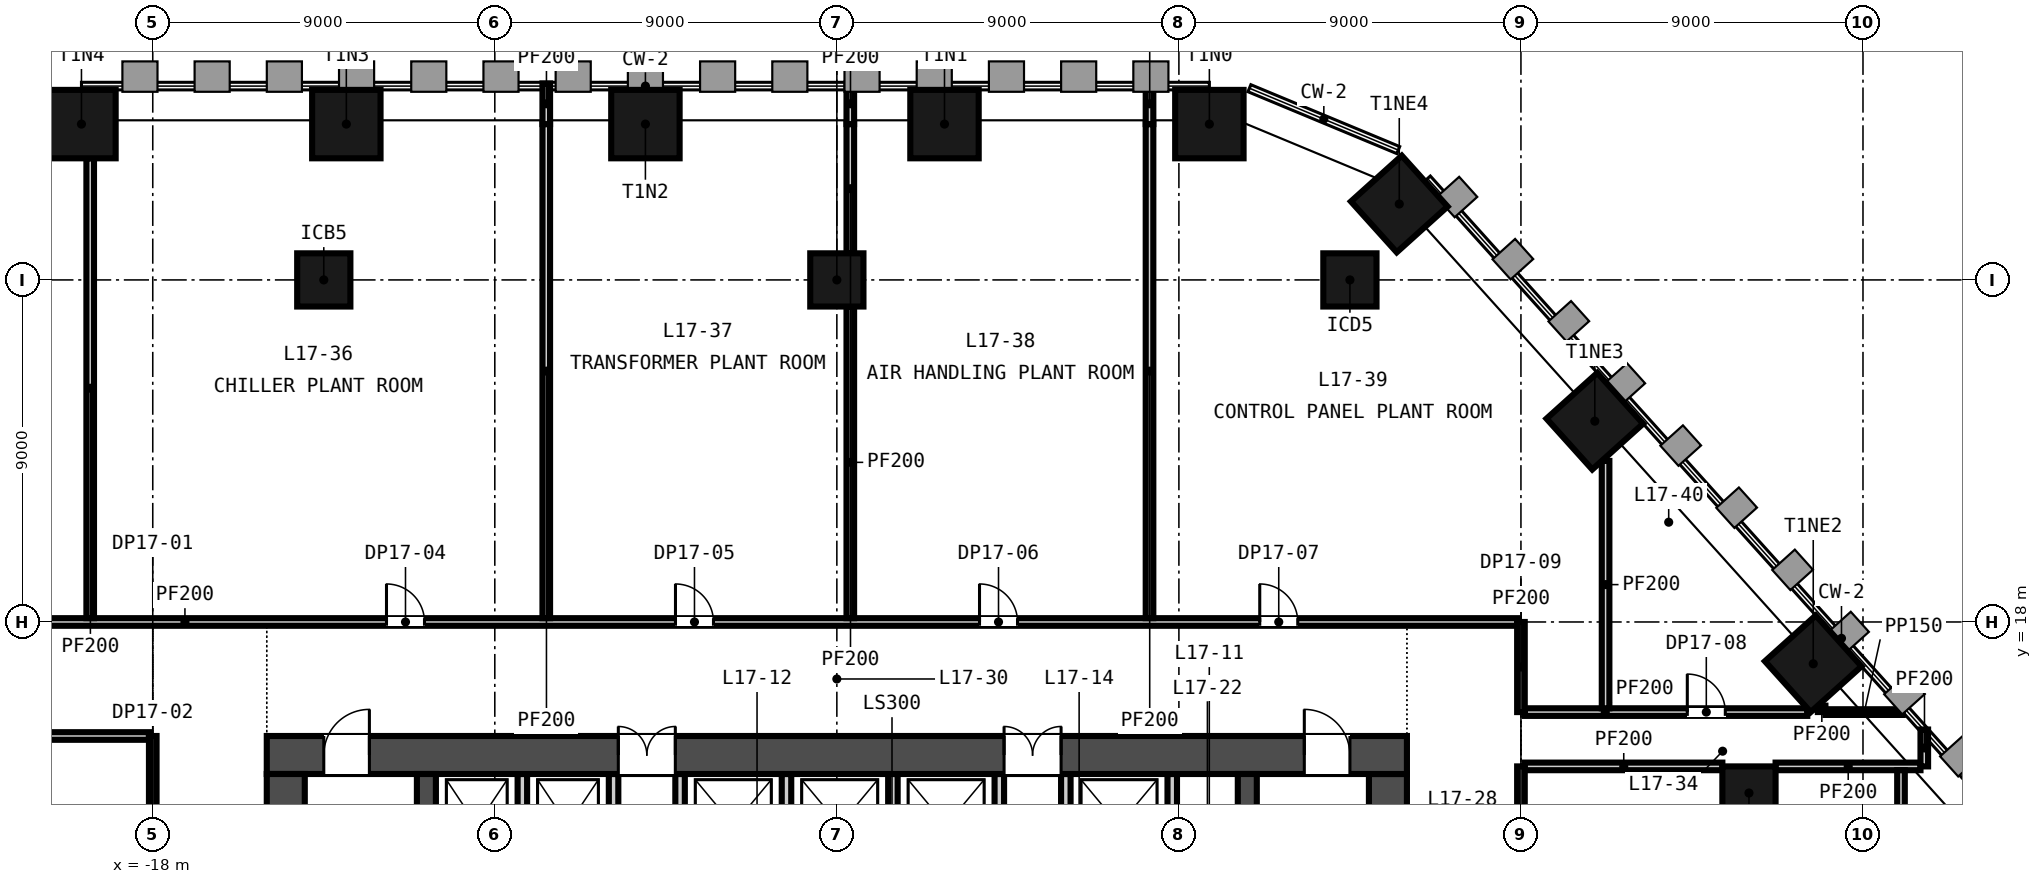
"""IFC4 building model, lengths in metres.
Left out: names, types, materials, properties, quantities, classifications, styles, units other than length and angle.
Written with IfcOpenShell. Run it as: python <this file> out.ifc"""

import sys

from ifc_helpers import new_model, si_unit, direction, frame, frame_2d, origin, origin_2d, place, context, subcontext, project, spatial, rectangle, extrude, element, fill, save


model = new_model("IFC4")
c1 = context("Model", 3, precision=1e-05, world=origin(), true_north=direction((0.0, 1.0)))
c2 = subcontext(c1, "Body", "Model", "MODEL_VIEW")
j1 = project(units=[si_unit("LENGTHUNIT", "METRE"), si_unit("PLANEANGLEUNIT", "RADIAN")], contexts=[c1])
p1 = place(None, origin())
s1 = spatial("IfcSite", under=j1, at=p1, CompositionType="ELEMENT")
p2 = place(p1, origin())
s2 = spatial("IfcBuilding", under=s1, at=p2, CompositionType="ELEMENT")
p3 = place(p2, frame((0.0, 0.0, 76.15)))
s3 = spatial("IfcBuildingStorey", under=s2, at=p3, CompositionType="ELEMENT", Elevation=76.15)
p4 = place(p3, frame((-15.0, 14.5, -0.3), z_axis=(0.0, 0.0, 1.0), x_axis=(1.0, 0.0, 0.0)))
e1 = element("IfcWall", 1, at=p4, inside=s3, PredefinedType="SOLIDWALL", context=c2, shape_type="SweptSolid", body=[
    extrude(rectangle(XDim=30.0, YDim=1.0, at=frame_2d((15.0, 0.0))), origin(), (0.0, 0.0, 1.0), 4.65),
])
p5 = place(p4, frame((9.25, 0.0, 0.3)))
e2 = element("IfcOpeningElement", 2, at=p5, cuts=e1, PredefinedType="OPENING", context=c2, shape_type="SweptSolid", body=[
    extrude(rectangle(XDim=1.5, YDim=2.1, at=frame_2d((0.75, 1.05))), frame((0.0, 0.51, 0.0), z_axis=(0.0, -1.0, 0.0), x_axis=(1.0, 0.0, 0.0)), (0.0, 0.0, 1.0), 1.02),
])
p6 = place(p4, frame((19.4, 0.0, 0.3)))
e3 = element("IfcOpeningElement", 3, at=p6, cuts=e1, PredefinedType="OPENING", context=c2, shape_type="SweptSolid", body=[
    extrude(rectangle(XDim=1.5, YDim=2.1, at=frame_2d((0.75, 1.05))), frame((0.0, 0.51, 0.0), z_axis=(0.0, -1.0, 0.0), x_axis=(1.0, 0.0, 0.0)), (0.0, 0.0, 1.0), 1.02),
])
p7 = place(p4, frame((1.5, 0.0, 0.3)))
e4 = element("IfcOpeningElement", 4, at=p7, cuts=e1, PredefinedType="OPENING", context=c2, shape_type="SweptSolid", body=[
    extrude(rectangle(XDim=1.2, YDim=2.1, at=frame_2d((0.6, 1.05))), frame((0.0, 0.51, 0.0), z_axis=(0.0, -1.0, 0.0), x_axis=(1.0, 0.0, 0.0)), (0.0, 0.0, 1.0), 1.02),
])
p8 = place(p4, frame((27.3, 0.0, 0.3)))
e5 = element("IfcOpeningElement", 5, at=p8, cuts=e1, PredefinedType="OPENING", context=c2, shape_type="SweptSolid", body=[
    extrude(rectangle(XDim=1.2, YDim=2.1, at=frame_2d((0.6, 1.05))), frame((0.0, 0.51, 0.0), z_axis=(0.0, -1.0, 0.0), x_axis=(1.0, 0.0, 0.0)), (0.0, 0.0, 1.0), 1.02),
])
for number, where, z_axis, x_axis in (
    (6, (-14.5, 1.0, -0.3), (0.0, 0.0, 1.0), (0.0, 1.0, 0.0)),
    (7, (14.5, 1.0, -0.3), (0.0, 0.0, 1.0), (0.0, 1.0, 0.0)),
):
    element("IfcWall", number, at=place(p3, frame(where, z_axis=z_axis, x_axis=x_axis)), inside=s3, PredefinedType="SOLIDWALL", context=c2, shape_type="SweptSolid", body=[
        extrude(rectangle(XDim=13.0, YDim=1.0, at=frame_2d((6.5, 0.0))), origin(), (0.0, 0.0, 1.0), 4.65),
    ])
for number, where, z_axis, x_axis in (
    (8, (-10.8, 1.0, -0.3), (0.0, 0.0, 1.0), (0.0, 1.0, 0.0)),
    (9, (10.8, 1.0, -0.3), (0.0, 0.0, 1.0), (0.0, 1.0, 0.0)),
):
    element("IfcWall", number, at=place(p3, frame(where, z_axis=z_axis, x_axis=x_axis)), inside=s3, PredefinedType="SOLIDWALL", context=c2, shape_type="SweptSolid", body=[
        extrude(rectangle(XDim=13.0, YDim=0.5, at=frame_2d((6.5, 0.0))), origin(), (0.0, 0.0, 1.0), 4.65),
    ])
for number, where, z_axis, x_axis in (
    (10, (9.802, 31.1, -0.3), (0.0, 0.0, 1.0), (-1.0, 0.0, 0.0)),
    (11, (2.832, 31.1, -0.3), (0.0, 0.0, 1.0), (-1.0, 0.0, 0.0)),
    (12, (-5.037, 31.1, -0.3), (0.0, 0.0, 1.0), (-1.0, 0.0, 0.0)),
    (13, (-12.907, 31.1, -0.3), (0.0, 0.0, 1.0), (-1.0, 0.0, 0.0)),
    (14, (-19.876, 31.1, -0.3), (0.0, 0.0, 1.0), (-1.0, 0.0, 0.0)),
    (15, (25.691, 16.9, -0.3), (0.0, 0.0, 1.0), (-0.669, 0.743, 0.0)),
    (16, (19.944, 23.283, -0.3), (0.0, 0.0, 1.0), (-0.669, 0.743, 0.0)),
    (17, (14.799, 28.998, -0.3), (0.0, 0.0, 1.0), (-0.669, 0.743, 0.0)),
):
    element("IfcColumn", number, at=place(p3, frame(where, z_axis=z_axis, x_axis=x_axis)), inside=s3, PredefinedType="COLUMN", context=c2, shape_type="SweptSolid", body=[
        extrude(rectangle(XDim=1.8, YDim=1.8, at=origin_2d()), origin(), (0.0, 0.0, 1.0), 4.65),
    ])
for number, where, z_axis, x_axis in (
    (18, (-13.5, 27.0, -0.3), (0.0, 0.0, 1.0), (1.0, 0.0, 0.0)),
    (19, (0.0, 27.0, -0.3), (0.0, 0.0, 1.0), (1.0, 0.0, 0.0)),
    (20, (13.5, 27.0, -0.3), (0.0, 0.0, 1.0), (1.0, 0.0, 0.0)),
    (21, (24.0, 13.5, -0.3), (0.0, 0.0, 1.0), (1.0, 0.0, 0.0)),
):
    element("IfcColumn", number, at=place(p3, frame(where, z_axis=z_axis, x_axis=x_axis)), inside=s3, PredefinedType="COLUMN", context=c2, shape_type="SweptSolid", body=[
        extrude(rectangle(XDim=1.4, YDim=1.4, at=origin_2d()), origin(), (0.0, 0.0, 1.0), 4.65),
    ])
for number, where, z_axis, x_axis in (
    (22, (-8.275, 11.3, 0.0), (0.0, 0.0, 1.0), (0.0, 1.0, 0.0)),
    (23, (-5.875, 11.3, 0.0), (0.0, 0.0, 1.0), (0.0, 1.0, 0.0)),
    (24, (-4.125, 11.3, 0.0), (0.0, 0.0, 1.0), (0.0, 1.0, 0.0)),
    (25, (-1.325, 11.3, 0.0), (0.0, 0.0, 1.0), (0.0, 1.0, 0.0)),
    (26, (1.475, 11.3, 0.0), (0.0, 0.0, 1.0), (0.0, 1.0, 0.0)),
    (27, (4.275, 11.3, 0.0), (0.0, 0.0, 1.0), (0.0, 1.0, 0.0)),
    (28, (6.025, 11.3, 0.0), (0.0, 0.0, 1.0), (0.0, 1.0, 0.0)),
    (29, (8.825, 11.3, 0.0), (0.0, 0.0, 1.0), (0.0, 1.0, 0.0)),
):
    element("IfcWall", number, at=place(p3, frame(where, z_axis=z_axis, x_axis=x_axis)), inside=s3, PredefinedType="PARTITIONING", context=c2, shape_type="SweptSolid", body=[
        extrude(rectangle(XDim=2.7, YDim=0.25, at=frame_2d((1.35, 0.0))), origin(), (0.0, 0.0, 1.0), 4.35),
    ])
p9 = place(p3, frame((18.1, 14.2, 0.0), z_axis=(0.0, 0.0, 1.0), x_axis=(1.0, 0.0, 0.0)))
e30 = element("IfcWall", 30, at=p9, inside=s3, PredefinedType="PARTITIONING", context=c2, shape_type="SweptSolid", body=[
    extrude(rectangle(XDim=5.2, YDim=0.2, at=frame_2d((2.6, 0.0))), origin(), (0.0, 0.0, 1.0), 3.75),
])
p10 = place(p3, frame((24.7, 14.2, 0.0), z_axis=(0.0, 0.0, 1.0), x_axis=(1.0, 0.0, 0.0)))
e31 = element("IfcWall", 31, at=p10, inside=s3, PredefinedType="PARTITIONING", context=c2, shape_type="SweptSolid", body=[
    extrude(rectangle(XDim=3.813, YDim=0.2, at=frame_2d((1.906, 0.0))), origin(), (0.0, 0.0, 1.0), 4.35),
])
p11 = place(p3, frame((-27.038, 15.0, 0.0), z_axis=(0.0, 0.0, 1.0), x_axis=(1.0, 0.0, 0.0)))
e32 = element("IfcWall", 32, at=p11, inside=s3, PredefinedType="PARTITIONING", context=c2, shape_type="SweptSolid", body=[
    extrude(rectangle(XDim=8.938, YDim=0.2, at=frame_2d((4.469, 0.0))), origin(), (0.0, 0.0, 1.0), 4.35),
])
p12 = place(p3, frame((18.1, 15.629, 0.0), z_axis=(0.0, 0.0, 1.0), x_axis=(1.0, 0.0, 0.0)))
e33 = element("IfcWall", 33, at=p12, inside=s3, PredefinedType="PARTITIONING", context=c2, shape_type="SweptSolid", body=[
    extrude(rectangle(XDim=7.435, YDim=0.2, at=frame_2d((3.717, 0.0))), origin(), (0.0, 0.0, 1.0), 4.35),
])
p13 = place(p12, frame((4.277, 0.0, 0.0)))
e34 = element("IfcOpeningElement", 34, at=p13, cuts=e33, PredefinedType="OPENING", context=c2, shape_type="SweptSolid", body=[
    extrude(rectangle(XDim=1.0, YDim=2.1, at=frame_2d((0.5, 1.05))), frame((0.0, 0.11, 0.0), z_axis=(0.0, -1.0, 0.0), x_axis=(1.0, 0.0, 0.0)), (0.0, 0.0, 1.0), 0.22),
])
p14 = place(p3, frame((26.012, 15.629, 0.0), z_axis=(0.0, 0.0, 1.0), x_axis=(1.0, 0.0, 0.0)))
e35 = element("IfcWall", 35, at=p14, inside=s3, PredefinedType="PARTITIONING", context=c2, shape_type="SweptSolid", body=[
    extrude(rectangle(XDim=2.035, YDim=0.15, at=frame_2d((1.018, 0.0))), origin(), (0.0, 0.0, 1.0), 3.5),
])
p15 = place(p3, frame((-26.117, 18.0, 0.0), z_axis=(0.0, 0.0, 1.0), x_axis=(1.0, 0.0, 0.0)))
e36 = element("IfcWall", 36, at=p15, inside=s3, PredefinedType="PARTITIONING", context=c2, shape_type="SweptSolid", body=[
    extrude(rectangle(XDim=44.017, YDim=0.2, at=frame_2d((22.008, 0.0))), origin(), (0.0, 0.0, 1.0), 4.35),
])
p16 = place(p15, frame((2.65, 0.0, 0.0)))
e37 = element("IfcOpeningElement", 37, at=p16, cuts=e36, PredefinedType="OPENING", context=c2, shape_type="SweptSolid", body=[
    extrude(rectangle(XDim=1.0, YDim=2.1, at=frame_2d((0.5, 1.05))), frame((0.0, 0.11, 0.0), z_axis=(0.0, -1.0, 0.0), x_axis=(1.0, 0.0, 0.0)), (0.0, 0.0, 1.0), 0.22),
])
p17 = place(p15, frame((14.267, 0.0, 0.0)))
e38 = element("IfcOpeningElement", 38, at=p17, cuts=e36, PredefinedType="OPENING", context=c2, shape_type="SweptSolid", body=[
    extrude(rectangle(XDim=1.0, YDim=2.1, at=frame_2d((0.5, 1.05))), frame((0.0, 0.11, 0.0), z_axis=(0.0, -1.0, 0.0), x_axis=(1.0, 0.0, 0.0)), (0.0, 0.0, 1.0), 0.22),
])
p18 = place(p15, frame((21.871, 0.0, 0.0)))
e39 = element("IfcOpeningElement", 39, at=p18, cuts=e36, PredefinedType="OPENING", context=c2, shape_type="SweptSolid", body=[
    extrude(rectangle(XDim=1.0, YDim=2.1, at=frame_2d((0.5, 1.05))), frame((0.0, 0.11, 0.0), z_axis=(0.0, -1.0, 0.0), x_axis=(1.0, 0.0, 0.0)), (0.0, 0.0, 1.0), 0.22),
])
p19 = place(p15, frame((29.871, 0.0, 0.0)))
e40 = element("IfcOpeningElement", 40, at=p19, cuts=e36, PredefinedType="OPENING", context=c2, shape_type="SweptSolid", body=[
    extrude(rectangle(XDim=1.0, YDim=2.1, at=frame_2d((0.5, 1.05))), frame((0.0, 0.11, 0.0), z_axis=(0.0, -1.0, 0.0), x_axis=(1.0, 0.0, 0.0)), (0.0, 0.0, 1.0), 0.22),
])
p20 = place(p15, frame((37.244, 0.0, 0.0)))
e41 = element("IfcOpeningElement", 41, at=p20, cuts=e36, PredefinedType="OPENING", context=c2, shape_type="SweptSolid", body=[
    extrude(rectangle(XDim=1.0, YDim=2.1, at=frame_2d((0.5, 1.05))), frame((0.0, 0.11, 0.0), z_axis=(0.0, -1.0, 0.0), x_axis=(1.0, 0.0, 0.0)), (0.0, 0.0, 1.0), 0.22),
])
p21 = place(p3, frame((-19.646, 18.1, 0.0), z_axis=(0.0, 0.0, 1.0), x_axis=(0.0, 1.0, 0.0)))
e42 = element("IfcWall", 42, at=p21, inside=s3, PredefinedType="PARTITIONING", context=c2, shape_type="SweptSolid", body=[
    extrude(rectangle(XDim=12.1, YDim=0.2, at=frame_2d((6.05, 0.0))), origin(), (0.0, 0.0, 1.0), 4.35),
])
p22 = place(p3, frame((-18.0, 1.251, 0.0), z_axis=(0.0, 0.0, 1.0), x_axis=(0.0, 1.0, 0.0)))
e43 = element("IfcWall", 43, at=p22, inside=s3, PredefinedType="PARTITIONING", context=c2, shape_type="SweptSolid", body=[
    extrude(rectangle(XDim=13.749, YDim=0.2, at=frame_2d((6.875, 0.0))), origin(), (0.0, 0.0, 1.0), 4.35),
])
p23 = place(p22, frame((0.9, 0.0, 0.0)))
e44 = element("IfcOpeningElement", 44, at=p23, cuts=e43, PredefinedType="OPENING", context=c2, shape_type="SweptSolid", body=[
    extrude(rectangle(XDim=1.8, YDim=2.4, at=frame_2d((0.9, 1.2))), frame((0.0, 0.11, 0.0), z_axis=(0.0, -1.0, 0.0), x_axis=(1.0, 0.0, 0.0)), (0.0, 0.0, 1.0), 0.22),
])
p24 = place(p22, frame((10.15, 0.0, 0.0)))
e45 = element("IfcOpeningElement", 45, at=p24, cuts=e43, PredefinedType="OPENING", context=c2, shape_type="SweptSolid", body=[
    extrude(rectangle(XDim=1.2, YDim=2.1, at=frame_2d((0.6, 1.05))), frame((0.0, 0.11, 0.0), z_axis=(0.0, -1.0, 0.0), x_axis=(1.0, 0.0, 0.0)), (0.0, 0.0, 1.0), 0.22),
])
p25 = place(p3, frame((-7.646, 18.1, 0.0), z_axis=(0.0, 0.0, 1.0), x_axis=(0.0, 1.0, 0.0)))
e46 = element("IfcWall", 46, at=p25, inside=s3, PredefinedType="PARTITIONING", context=c2, shape_type="SweptSolid", body=[
    extrude(rectangle(XDim=13.0, YDim=0.2, at=frame_2d((6.5, 0.0))), origin(), (0.0, 0.0, 1.0), 4.35),
])
p26 = place(p3, frame((-7.646, 31.1, 0.0), z_axis=(0.0, 0.0, 1.0), x_axis=(0.0, 1.0, 0.0)))
e47 = element("IfcWall", 47, at=p26, inside=s3, PredefinedType="PARTITIONING", context=c2, shape_type="SweptSolid", body=[
    extrude(rectangle(XDim=1.07, YDim=0.2, at=frame_2d((0.535, 0.0))), origin(), (0.0, 0.0, 1.0), 3.5),
])
p27 = place(p3, frame((0.354, 18.1, 0.0), z_axis=(0.0, 0.0, 1.0), x_axis=(0.0, 1.0, 0.0)))
e48 = element("IfcWall", 48, at=p27, inside=s3, PredefinedType="PARTITIONING", context=c2, shape_type="SweptSolid", body=[
    extrude(rectangle(XDim=8.2, YDim=0.2, at=frame_2d((4.1, 0.0))), origin(), (0.0, 0.0, 1.0), 4.35),
])
p28 = place(p3, frame((0.354, 27.7, 0.0), z_axis=(0.0, 0.0, 1.0), x_axis=(0.0, 1.0, 0.0)))
e49 = element("IfcWall", 49, at=p28, inside=s3, PredefinedType="PARTITIONING", context=c2, shape_type="SweptSolid", body=[
    extrude(rectangle(XDim=3.4, YDim=0.2, at=frame_2d((1.7, 0.0))), origin(), (0.0, 0.0, 1.0), 4.35),
])
p29 = place(p3, frame((0.354, 31.1, 0.0), z_axis=(0.0, 0.0, 1.0), x_axis=(0.0, 1.0, 0.0)))
e50 = element("IfcWall", 50, at=p29, inside=s3, PredefinedType="PARTITIONING", context=c2, shape_type="SweptSolid", body=[
    extrude(rectangle(XDim=1.07, YDim=0.2, at=frame_2d((0.535, 0.0))), origin(), (0.0, 0.0, 1.0), 3.5),
])
p30 = place(p3, frame((8.227, 18.1, 0.0), z_axis=(0.0, 0.0, 1.0), x_axis=(0.0, 1.0, 0.0)))
e51 = element("IfcWall", 51, at=p30, inside=s3, PredefinedType="PARTITIONING", context=c2, shape_type="SweptSolid", body=[
    extrude(rectangle(XDim=13.0, YDim=0.2, at=frame_2d((6.5, 0.0))), origin(), (0.0, 0.0, 1.0), 4.35),
])
p31 = place(p3, frame((8.227, 31.1, 0.0), z_axis=(0.0, 0.0, 1.0), x_axis=(0.0, 1.0, 0.0)))
e52 = element("IfcWall", 52, at=p31, inside=s3, PredefinedType="PARTITIONING", context=c2, shape_type="SweptSolid", body=[
    extrude(rectangle(XDim=1.07, YDim=0.2, at=frame_2d((0.535, 0.0))), origin(), (0.0, 0.0, 1.0), 3.5),
])
p32 = place(p3, frame((18.0, 0.0, 0.0), z_axis=(0.0, 0.0, 1.0), x_axis=(0.0, 1.0, 0.0)))
e53 = element("IfcWall", 53, at=p32, inside=s3, PredefinedType="PARTITIONING", context=c2, shape_type="SweptSolid", body=[
    extrude(rectangle(XDim=14.2, YDim=0.2, at=frame_2d((7.1, 0.0))), origin(), (0.0, 0.0, 1.0), 4.35),
])
p33 = place(p32, frame((6.65, 0.0, 0.0)))
e54 = element("IfcOpeningElement", 54, at=p33, cuts=e53, PredefinedType="OPENING", context=c2, shape_type="SweptSolid", body=[
    extrude(rectangle(XDim=1.0, YDim=2.1, at=frame_2d((0.5, 1.05))), frame((0.0, 0.11, 0.0), z_axis=(0.0, -1.0, 0.0), x_axis=(1.0, 0.0, 0.0)), (0.0, 0.0, 1.0), 0.22),
])
p34 = place(p3, frame((18.0, 15.629, 0.0), z_axis=(0.0, 0.0, 1.0), x_axis=(0.0, 1.0, 0.0)))
e55 = element("IfcWall", 55, at=p34, inside=s3, PredefinedType="PARTITIONING", context=c2, shape_type="SweptSolid", body=[
    extrude(rectangle(XDim=2.371, YDim=0.2, at=frame_2d((1.185, 0.0))), origin(), (0.0, 0.0, 1.0), 4.35),
])
p35 = place(p3, frame((20.227, 15.729, 0.0), z_axis=(0.0, 0.0, 1.0), x_axis=(0.0, 1.0, 0.0)))
e56 = element("IfcWall", 56, at=p35, inside=s3, PredefinedType="PARTITIONING", context=c2, shape_type="SweptSolid", body=[
    extrude(rectangle(XDim=6.509, YDim=0.2, at=frame_2d((3.254, 0.0))), origin(), (0.0, 0.0, 1.0), 4.35),
])
p36 = place(p3, frame((25.912, 15.63, 0.0), z_axis=(0.0, 0.0, 1.0), x_axis=(0.0, 1.0, 0.0)))
e57 = element("IfcWall", 57, at=p36, inside=s3, PredefinedType="PARTITIONING", context=c2, shape_type="SweptSolid", body=[
    extrude(rectangle(XDim=0.168, YDim=0.2, at=frame_2d((0.084, 0.0))), origin(), (0.0, 0.0, 1.0), 4.35),
])
p37 = place(p3, frame((28.0, 0.1, 0.0), z_axis=(0.0, 0.0, 1.0), x_axis=(0.0, 1.0, 0.0)))
e58 = element("IfcWall", 58, at=p37, inside=s3, PredefinedType="PARTITIONING", context=c2, shape_type="SweptSolid", body=[
    extrude(rectangle(XDim=14.0, YDim=0.2, at=frame_2d((7.0, 0.0))), origin(), (0.0, 0.0, 1.0), 4.35),
])
p38 = place(p3, frame((28.613, 14.2, 0.0), z_axis=(0.0, 0.0, 1.0), x_axis=(0.0, 1.0, 0.0)))
e59 = element("IfcWall", 59, at=p38, inside=s3, PredefinedType="PARTITIONING", context=c2, shape_type="SweptSolid", body=[
    extrude(rectangle(XDim=0.97, YDim=0.2, at=frame_2d((0.485, 0.0))), origin(), (0.0, 0.0, 1.0), 3.5),
])
p39 = place(p5, origin())
e60 = element("IfcDoor", 60, at=p39, inside=s3, OperationType="DOUBLE_DOOR_SINGLE_SWING", PredefinedType="DOOR", context=c2, shape_type="SweptSolid", body=[
    extrude(rectangle(XDim=1.5, YDim=2.1, at=frame_2d((0.75, 1.05))), frame((0.0, 0.025, 0.0), z_axis=(0.0, -1.0, 0.0), x_axis=(1.0, 0.0, 0.0)), (0.0, 0.0, 1.0), 0.05),
])
fill(e2, e60)
p40 = place(p6, origin())
e61 = element("IfcDoor", 61, at=p40, inside=s3, OperationType="DOUBLE_DOOR_SINGLE_SWING", PredefinedType="DOOR", context=c2, shape_type="SweptSolid", body=[
    extrude(rectangle(XDim=1.5, YDim=2.1, at=frame_2d((0.75, 1.05))), frame((0.0, 0.025, 0.0), z_axis=(0.0, -1.0, 0.0), x_axis=(1.0, 0.0, 0.0)), (0.0, 0.0, 1.0), 0.05),
])
fill(e3, e61)
p41 = place(p7, origin())
e62 = element("IfcDoor", 62, at=p41, inside=s3, OperationType="SINGLE_SWING_RIGHT", PredefinedType="DOOR", context=c2, shape_type="SweptSolid", body=[
    extrude(rectangle(XDim=1.2, YDim=2.1, at=frame_2d((0.6, 1.05))), frame((0.0, 0.025, 0.0), z_axis=(0.0, -1.0, 0.0), x_axis=(1.0, 0.0, 0.0)), (0.0, 0.0, 1.0), 0.05),
])
fill(e4, e62)
p42 = place(p8, origin())
e63 = element("IfcDoor", 63, at=p42, inside=s3, OperationType="SINGLE_SWING_LEFT", PredefinedType="DOOR", context=c2, shape_type="SweptSolid", body=[
    extrude(rectangle(XDim=1.2, YDim=2.1, at=frame_2d((0.6, 1.05))), frame((0.0, 0.025, 0.0), z_axis=(0.0, -1.0, 0.0), x_axis=(1.0, 0.0, 0.0)), (0.0, 0.0, 1.0), 0.05),
])
fill(e5, e63)
p43 = place(p17, origin())
e64 = element("IfcDoor", 64, at=p43, inside=s3, OperationType="SINGLE_SWING_LEFT", PredefinedType="DOOR", context=c2, shape_type="SweptSolid", body=[
    extrude(rectangle(XDim=1.0, YDim=2.1, at=frame_2d((0.5, 1.05))), frame((0.0, 0.025, 0.0), z_axis=(0.0, -1.0, 0.0), x_axis=(1.0, 0.0, 0.0)), (0.0, 0.0, 1.0), 0.05),
])
fill(e38, e64)
p44 = place(p18, origin())
e65 = element("IfcDoor", 65, at=p44, inside=s3, OperationType="SINGLE_SWING_LEFT", PredefinedType="DOOR", context=c2, shape_type="SweptSolid", body=[
    extrude(rectangle(XDim=1.0, YDim=2.1, at=frame_2d((0.5, 1.05))), frame((0.0, 0.025, 0.0), z_axis=(0.0, -1.0, 0.0), x_axis=(1.0, 0.0, 0.0)), (0.0, 0.0, 1.0), 0.05),
])
fill(e39, e65)
p45 = place(p19, origin())
e66 = element("IfcDoor", 66, at=p45, inside=s3, OperationType="SINGLE_SWING_LEFT", PredefinedType="DOOR", context=c2, shape_type="SweptSolid", body=[
    extrude(rectangle(XDim=1.0, YDim=2.1, at=frame_2d((0.5, 1.05))), frame((0.0, 0.025, 0.0), z_axis=(0.0, -1.0, 0.0), x_axis=(1.0, 0.0, 0.0)), (0.0, 0.0, 1.0), 0.05),
])
fill(e40, e66)
p46 = place(p20, origin())
e67 = element("IfcDoor", 67, at=p46, inside=s3, OperationType="SINGLE_SWING_LEFT", PredefinedType="DOOR", context=c2, shape_type="SweptSolid", body=[
    extrude(rectangle(XDim=1.0, YDim=2.1, at=frame_2d((0.5, 1.05))), frame((0.0, 0.025, 0.0), z_axis=(0.0, -1.0, 0.0), x_axis=(1.0, 0.0, 0.0)), (0.0, 0.0, 1.0), 0.05),
])
fill(e41, e67)
p47 = place(p13, origin())
e68 = element("IfcDoor", 68, at=p47, inside=s3, OperationType="SINGLE_SWING_LEFT", PredefinedType="DOOR", context=c2, shape_type="SweptSolid", body=[
    extrude(rectangle(XDim=1.0, YDim=2.1, at=frame_2d((0.5, 1.05))), frame((0.0, 0.025, 0.0), z_axis=(0.0, -1.0, 0.0), x_axis=(1.0, 0.0, 0.0)), (0.0, 0.0, 1.0), 0.05),
])
fill(e34, e68)
save(model, sys.argv[1])
